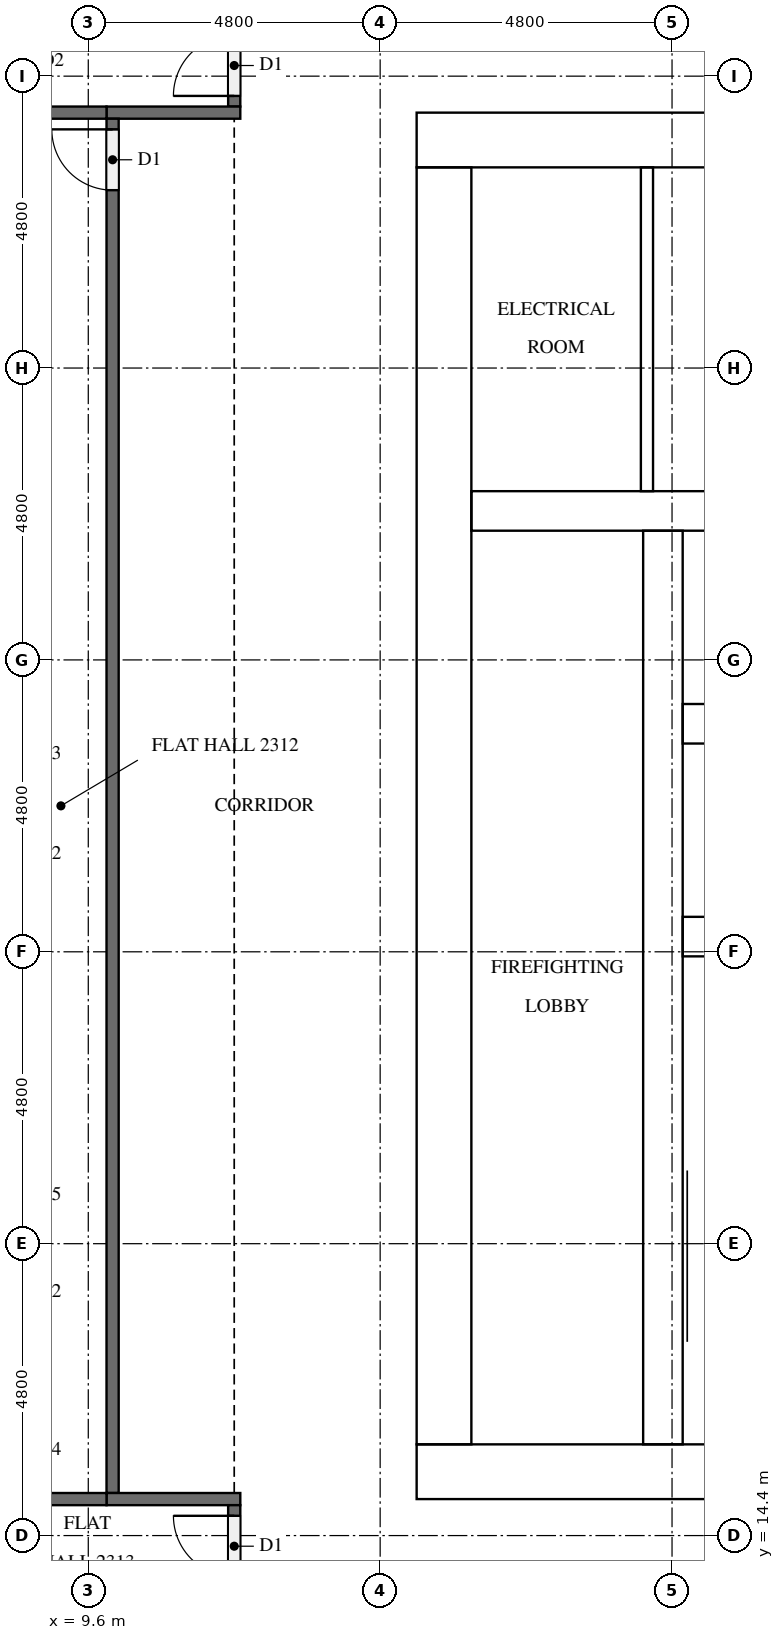
"""IFC4 building model, lengths in metres.
Left out: names, types, materials, properties, quantities, classifications, styles, units other than length and angle.
Written with IfcOpenShell. Run it as: python <this file> out.ifc"""

import sys

from ifc_helpers import new_model, si_unit, direction, frame, frame_2d, origin, place, context, subcontext, project, spatial, rectangle, extrude, element, fill, save


model = new_model("IFC4")
c1 = context("Model", 3, precision=1e-05, world=origin(), true_north=direction((0.0, 1.0)))
c2 = subcontext(c1, "Body", "Model", "MODEL_VIEW")
j1 = project(units=[si_unit("LENGTHUNIT", "METRE"), si_unit("PLANEANGLEUNIT", "RADIAN")], contexts=[c1])
p1 = place(None, origin())
s1 = spatial("IfcSite", under=j1, at=p1, CompositionType="ELEMENT")
p2 = place(p1, origin())
s2 = spatial("IfcBuilding", under=s1, at=p2, CompositionType="ELEMENT")
p3 = place(p2, frame((0.0, 0.0, 92.7)))
s3 = spatial("IfcBuildingStorey", under=s2, at=p3, CompositionType="ELEMENT", Elevation=92.7)
p4 = place(p3, frame((15.0, 15.45, 0.0), z_axis=(0.0, 0.0, 1.0), x_axis=(1.0, 0.0, 0.0)))
e1 = element("IfcWall", 1, at=p4, inside=s3, PredefinedType="SHEAR", context=c2, shape_type="SweptSolid", body=[
    extrude(rectangle(XDim=32.4, YDim=0.9, at=frame_2d((16.2, 0.0))), origin(), (0.0, 0.0, 1.0), 3.2),
])
p5 = place(p4, frame((15.3, 0.0, 0.0)))
e2 = element("IfcOpeningElement", 2, at=p5, cuts=e1, PredefinedType="OPENING", context=c2, shape_type="SweptSolid", body=[
    extrude(rectangle(XDim=1.8, YDim=2.1, at=frame_2d((0.9, 1.05))), frame((0.0, 0.46, 0.0), z_axis=(0.0, -1.0, 0.0), x_axis=(1.0, 0.0, 0.0)), (0.0, 0.0, 1.0), 0.92),
])
p6 = place(p3, frame((15.0, 37.35, 0.0), z_axis=(0.0, 0.0, 1.0), x_axis=(1.0, 0.0, 0.0)))
e3 = element("IfcWall", 3, at=p6, inside=s3, PredefinedType="SHEAR", context=c2, shape_type="SweptSolid", body=[
    extrude(rectangle(XDim=32.4, YDim=0.9, at=frame_2d((16.2, 0.0))), origin(), (0.0, 0.0, 1.0), 3.2),
])
p7 = place(p6, frame((15.3, 0.0, 0.0)))
e4 = element("IfcOpeningElement", 4, at=p7, cuts=e3, PredefinedType="OPENING", context=c2, shape_type="SweptSolid", body=[
    extrude(rectangle(XDim=1.8, YDim=2.1, at=frame_2d((0.9, 1.05))), frame((0.0, 0.46, 0.0), z_axis=(0.0, -1.0, 0.0), x_axis=(1.0, 0.0, 0.0)), (0.0, 0.0, 1.0), 0.92),
])
p8 = place(p6, frame((1.794, 0.0, 0.0)))
e5 = element("IfcOpeningElement", 5, at=p8, cuts=e3, PredefinedType="OPENING", context=c2, shape_type="SweptSolid", body=[
    extrude(rectangle(XDim=1.0, YDim=2.1, at=frame_2d((0.5, 1.05))), frame((0.0, 0.46, 0.0), z_axis=(0.0, -1.0, 0.0), x_axis=(1.0, 0.0, 0.0)), (0.0, 0.0, 1.0), 0.92),
])
p9 = place(p6, frame((5.331, 0.0, 0.0)))
e6 = element("IfcOpeningElement", 6, at=p9, cuts=e3, PredefinedType="OPENING", context=c2, shape_type="SweptSolid", body=[
    extrude(rectangle(XDim=1.0, YDim=2.1, at=frame_2d((0.5, 1.05))), frame((0.0, 0.46, 0.0), z_axis=(0.0, -1.0, 0.0), x_axis=(1.0, 0.0, 0.0)), (0.0, 0.0, 1.0), 0.92),
])
p10 = place(p3, frame((15.45, 15.9, 0.0), z_axis=(0.0, 0.0, 1.0), x_axis=(0.0, 1.0, 0.0)))
e7 = element("IfcWall", 7, at=p10, inside=s3, PredefinedType="SHEAR", context=c2, shape_type="SweptSolid", body=[
    extrude(rectangle(XDim=21.0, YDim=0.9, at=frame_2d((10.5, 0.0))), origin(), (0.0, 0.0, 1.0), 3.2),
])
p11 = place(p10, frame((4.86, 0.0, 0.0)))
e8 = element("IfcOpeningElement", 8, at=p11, cuts=e7, PredefinedType="OPENING", context=c2, shape_type="SweptSolid", body=[
    extrude(rectangle(XDim=1.2, YDim=2.1, at=frame_2d((0.6, 1.05))), frame((0.0, 0.46, 0.0), z_axis=(0.0, -1.0, 0.0), x_axis=(1.0, 0.0, 0.0)), (0.0, 0.0, 1.0), 0.92),
])
p12 = place(p3, frame((19.05, 15.9, 0.0), z_axis=(0.0, 0.0, 1.0), x_axis=(0.0, 1.0, 0.0)))
e9 = element("IfcWall", 9, at=p12, inside=s3, PredefinedType="SHEAR", context=c2, shape_type="SweptSolid", body=[
    extrude(rectangle(XDim=15.025, YDim=0.65, at=frame_2d((7.513, 0.0))), origin(), (0.0, 0.0, 1.0), 3.2),
])
p13 = place(p12, frame((9.55, 0.0, 0.0)))
e10 = element("IfcOpeningElement", 10, at=p13, cuts=e9, PredefinedType="OPENING", context=c2, shape_type="SweptSolid", body=[
    extrude(rectangle(XDim=1.1, YDim=2.1, at=frame_2d((0.55, 1.05))), frame((0.0, 0.335, 0.0), z_axis=(0.0, -1.0, 0.0), x_axis=(1.0, 0.0, 0.0)), (0.0, 0.0, 1.0), 0.67),
])
p14 = place(p12, frame((13.05, 0.0, 0.0)))
e11 = element("IfcOpeningElement", 11, at=p14, cuts=e9, PredefinedType="OPENING", context=c2, shape_type="SweptSolid", body=[
    extrude(rectangle(XDim=1.1, YDim=2.1, at=frame_2d((0.55, 1.05))), frame((0.0, 0.335, 0.0), z_axis=(0.0, -1.0, 0.0), x_axis=(1.0, 0.0, 0.0)), (0.0, 0.0, 1.0), 0.67),
])
p15 = place(p12, frame((0.3, 0.0, 0.0)))
e12 = element("IfcOpeningElement", 12, at=p15, cuts=e9, PredefinedType="OPENING", context=c2, shape_type="SweptSolid", body=[
    extrude(rectangle(XDim=1.2, YDim=2.1, at=frame_2d((0.6, 1.05))), frame((0.0, 0.335, 0.0), z_axis=(0.0, -1.0, 0.0), x_axis=(1.0, 0.0, 0.0)), (0.0, 0.0, 1.0), 0.67),
])
for number, where, z_axis, x_axis in (
    (13, (19.375, 24.25, 0.0), (0.0, 0.0, 1.0), (1.0, 0.0, 0.0)),
    (14, (19.375, 27.75, 0.0), (0.0, 0.0, 1.0), (1.0, 0.0, 0.0)),
):
    element("IfcWall", number, at=place(p3, frame(where, z_axis=z_axis, x_axis=x_axis)), inside=s3, PredefinedType="SHEAR", context=c2, shape_type="SweptSolid", body=[
        extrude(rectangle(XDim=3.4, YDim=0.65, at=frame_2d((1.7, 0.0))), origin(), (0.0, 0.0, 1.0), 3.2),
    ])
p16 = place(p3, frame((15.9, 31.25, 0.0), z_axis=(0.0, 0.0, 1.0), x_axis=(1.0, 0.0, 0.0)))
e15 = element("IfcWall", 15, at=p16, inside=s3, PredefinedType="SHEAR", context=c2, shape_type="SweptSolid", body=[
    extrude(rectangle(XDim=6.875, YDim=0.65, at=frame_2d((3.438, 0.0))), origin(), (0.0, 0.0, 1.0), 3.2),
])
p17 = place(p3, frame((18.788, 31.575, 0.0), z_axis=(0.0, 0.0, 1.0), x_axis=(0.0, 1.0, 0.0)))
e16 = element("IfcWall", 16, at=p17, inside=s3, PredefinedType="PARTITIONING", context=c2, shape_type="SweptSolid", body=[
    extrude(rectangle(XDim=5.325, YDim=0.2, at=frame_2d((2.663, 0.0))), origin(), (0.0, 0.0, 1.0), 3.2),
])
p18 = place(p3, frame((12.0, 37.9, 0.0), z_axis=(0.0, 0.0, 1.0), x_axis=(0.0, 1.0, 0.0)))
e17 = element("IfcWall", 17, at=p18, inside=s3, PredefinedType="PARTITIONING", context=c2, shape_type="SweptSolid", body=[
    extrude(rectangle(XDim=2.8, YDim=0.2, at=frame_2d((1.4, 0.0))), origin(), (0.0, 0.0, 1.0), 3.2),
])
p19 = place(p18, frame((0.175, 0.0, 0.0)))
e18 = element("IfcOpeningElement", 18, at=p19, cuts=e17, PredefinedType="OPENING", context=c2, shape_type="SweptSolid", body=[
    extrude(rectangle(XDim=1.0, YDim=2.1, at=frame_2d((0.5, 1.05))), frame((0.0, 0.11, 0.0), z_axis=(0.0, -1.0, 0.0), x_axis=(1.0, 0.0, 0.0)), (0.0, 0.0, 1.0), 0.22),
])
p20 = place(p3, frame((12.1, 37.8, 0.0), z_axis=(0.0, 0.0, 1.0), x_axis=(-1.0, 0.0, 0.0)))
e19 = element("IfcWall", 19, at=p20, inside=s3, PredefinedType="PARTITIONING", context=c2, shape_type="SweptSolid", body=[
    extrude(rectangle(XDim=2.2, YDim=0.2, at=frame_2d((1.1, 0.0))), origin(), (0.0, 0.0, 1.0), 3.2),
])
p21 = place(p3, frame((10.0, 15.1, 0.0), z_axis=(0.0, 0.0, 1.0), x_axis=(0.0, 1.0, 0.0)))
e20 = element("IfcWall", 20, at=p21, inside=s3, PredefinedType="PARTITIONING", context=c2, shape_type="SweptSolid", body=[
    extrude(rectangle(XDim=22.6, YDim=0.2, at=frame_2d((11.3, 0.0))), origin(), (0.0, 0.0, 1.0), 3.2),
])
p22 = place(p21, frame((21.425, 0.0, 0.0)))
e21 = element("IfcOpeningElement", 21, at=p22, cuts=e20, PredefinedType="OPENING", context=c2, shape_type="SweptSolid", body=[
    extrude(rectangle(XDim=1.0, YDim=2.1, at=frame_2d((0.5, 1.05))), frame((0.0, 0.11, 0.0), z_axis=(0.0, -1.0, 0.0), x_axis=(1.0, 0.0, 0.0)), (0.0, 0.0, 1.0), 0.22),
])
p23 = place(p3, frame((9.9, 15.0, 0.0), z_axis=(0.0, 0.0, 1.0), x_axis=(1.0, 0.0, 0.0)))
e22 = element("IfcWall", 22, at=p23, inside=s3, PredefinedType="PARTITIONING", context=c2, shape_type="SweptSolid", body=[
    extrude(rectangle(XDim=2.2, YDim=0.2, at=frame_2d((1.1, 0.0))), origin(), (0.0, 0.0, 1.0), 3.2),
])
p24 = place(p3, frame((12.0, 12.1, 0.0), z_axis=(0.0, 0.0, 1.0), x_axis=(0.0, 1.0, 0.0)))
e23 = element("IfcWall", 23, at=p24, inside=s3, PredefinedType="PARTITIONING", context=c2, shape_type="SweptSolid", body=[
    extrude(rectangle(XDim=2.8, YDim=0.2, at=frame_2d((1.4, 0.0))), origin(), (0.0, 0.0, 1.0), 3.2),
])
p25 = place(p24, frame((1.625, 0.0, 0.0)))
e24 = element("IfcOpeningElement", 24, at=p25, cuts=e23, PredefinedType="OPENING", context=c2, shape_type="SweptSolid", body=[
    extrude(rectangle(XDim=1.0, YDim=2.1, at=frame_2d((0.5, 1.05))), frame((0.0, 0.11, 0.0), z_axis=(0.0, -1.0, 0.0), x_axis=(1.0, 0.0, 0.0)), (0.0, 0.0, 1.0), 0.22),
])
p26 = place(p3, frame((5.225, 37.8, 0.0), z_axis=(0.0, 0.0, 1.0), x_axis=(1.0, 0.0, 0.0)))
e25 = element("IfcWall", 25, at=p26, inside=s3, PredefinedType="PARTITIONING", context=c2, shape_type="SweptSolid", body=[
    extrude(rectangle(XDim=4.675, YDim=0.2, at=frame_2d((2.337, 0.0))), origin(), (0.0, 0.0, 1.0), 3.2),
])
p27 = place(p3, frame((4.9, 15.0, 0.0), z_axis=(0.0, 0.0, 1.0), x_axis=(1.0, 0.0, 0.0)))
e26 = element("IfcWall", 26, at=p27, inside=s3, PredefinedType="PARTITIONING", context=c2, shape_type="SweptSolid", body=[
    extrude(rectangle(XDim=5.0, YDim=0.2, at=frame_2d((2.5, 0.0))), origin(), (0.0, 0.0, 1.0), 3.2),
])
p28 = place(p13, origin())
e27 = element("IfcDoor", 27, at=p28, inside=s3, OperationType="DOUBLE_DOOR_SLIDING", PredefinedType="DOOR", context=c2, shape_type="SweptSolid", body=[
    extrude(rectangle(XDim=1.1, YDim=2.1, at=frame_2d((0.55, 1.05))), frame((0.0, 0.025, 0.0), z_axis=(0.0, -1.0, 0.0), x_axis=(1.0, 0.0, 0.0)), (0.0, 0.0, 1.0), 0.05),
])
fill(e10, e27)
p29 = place(p14, origin())
e28 = element("IfcDoor", 28, at=p29, inside=s3, OperationType="DOUBLE_DOOR_SLIDING", PredefinedType="DOOR", context=c2, shape_type="SweptSolid", body=[
    extrude(rectangle(XDim=1.1, YDim=2.1, at=frame_2d((0.55, 1.05))), frame((0.0, 0.025, 0.0), z_axis=(0.0, -1.0, 0.0), x_axis=(1.0, 0.0, 0.0)), (0.0, 0.0, 1.0), 0.05),
])
fill(e11, e28)
p30 = place(p15, frame((1.2, 0.0, 0.0), z_axis=(0.0, 0.0, 1.0), x_axis=(-1.0, 0.0, 0.0)))
e29 = element("IfcDoor", 29, at=p30, inside=s3, OperationType="SINGLE_SWING_LEFT", PredefinedType="DOOR", context=c2, shape_type="SweptSolid", body=[
    extrude(rectangle(XDim=1.2, YDim=2.1, at=frame_2d((0.6, 1.05))), frame((0.0, 0.025, 0.0), z_axis=(0.0, -1.0, 0.0), x_axis=(1.0, 0.0, 0.0)), (0.0, 0.0, 1.0), 0.05),
])
fill(e12, e29)
p31 = place(p11, frame((1.2, 0.0, 0.0), z_axis=(0.0, 0.0, 1.0), x_axis=(-1.0, 0.0, 0.0)))
e30 = element("IfcDoor", 30, at=p31, inside=s3, OperationType="SINGLE_SWING_RIGHT", PredefinedType="DOOR", context=c2, shape_type="SweptSolid", body=[
    extrude(rectangle(XDim=1.2, YDim=2.1, at=frame_2d((0.6, 1.05))), frame((0.0, 0.025, 0.0), z_axis=(0.0, -1.0, 0.0), x_axis=(1.0, 0.0, 0.0)), (0.0, 0.0, 1.0), 0.05),
])
fill(e8, e30)
p32 = place(p8, origin())
e31 = element("IfcDoor", 31, at=p32, inside=s3, OperationType="SINGLE_SWING_RIGHT", PredefinedType="DOOR", context=c2, shape_type="SweptSolid", body=[
    extrude(rectangle(XDim=1.0, YDim=2.1, at=frame_2d((0.5, 1.05))), frame((0.0, 0.025, 0.0), z_axis=(0.0, -1.0, 0.0), x_axis=(1.0, 0.0, 0.0)), (0.0, 0.0, 1.0), 0.05),
])
fill(e5, e31)
p33 = place(p19, origin())
e32 = element("IfcDoor", 32, at=p33, inside=s3, OperationType="SINGLE_SWING_LEFT", PredefinedType="DOOR", context=c2, shape_type="SweptSolid", body=[
    extrude(rectangle(XDim=1.0, YDim=2.1, at=frame_2d((0.5, 1.05))), frame((0.0, 0.025, 0.0), z_axis=(0.0, -1.0, 0.0), x_axis=(1.0, 0.0, 0.0)), (0.0, 0.0, 1.0), 0.05),
])
fill(e18, e32)
p34 = place(p22, origin())
e33 = element("IfcDoor", 33, at=p34, inside=s3, OperationType="SINGLE_SWING_RIGHT", PredefinedType="DOOR", context=c2, shape_type="SweptSolid", body=[
    extrude(rectangle(XDim=1.0, YDim=2.1, at=frame_2d((0.5, 1.05))), frame((0.0, 0.025, 0.0), z_axis=(0.0, -1.0, 0.0), x_axis=(1.0, 0.0, 0.0)), (0.0, 0.0, 1.0), 0.05),
])
fill(e21, e33)
p35 = place(p25, origin())
e34 = element("IfcDoor", 34, at=p35, inside=s3, OperationType="SINGLE_SWING_RIGHT", PredefinedType="DOOR", context=c2, shape_type="SweptSolid", body=[
    extrude(rectangle(XDim=1.0, YDim=2.1, at=frame_2d((0.5, 1.05))), frame((0.0, 0.025, 0.0), z_axis=(0.0, -1.0, 0.0), x_axis=(1.0, 0.0, 0.0)), (0.0, 0.0, 1.0), 0.05),
])
fill(e24, e34)
save(model, sys.argv[1])
